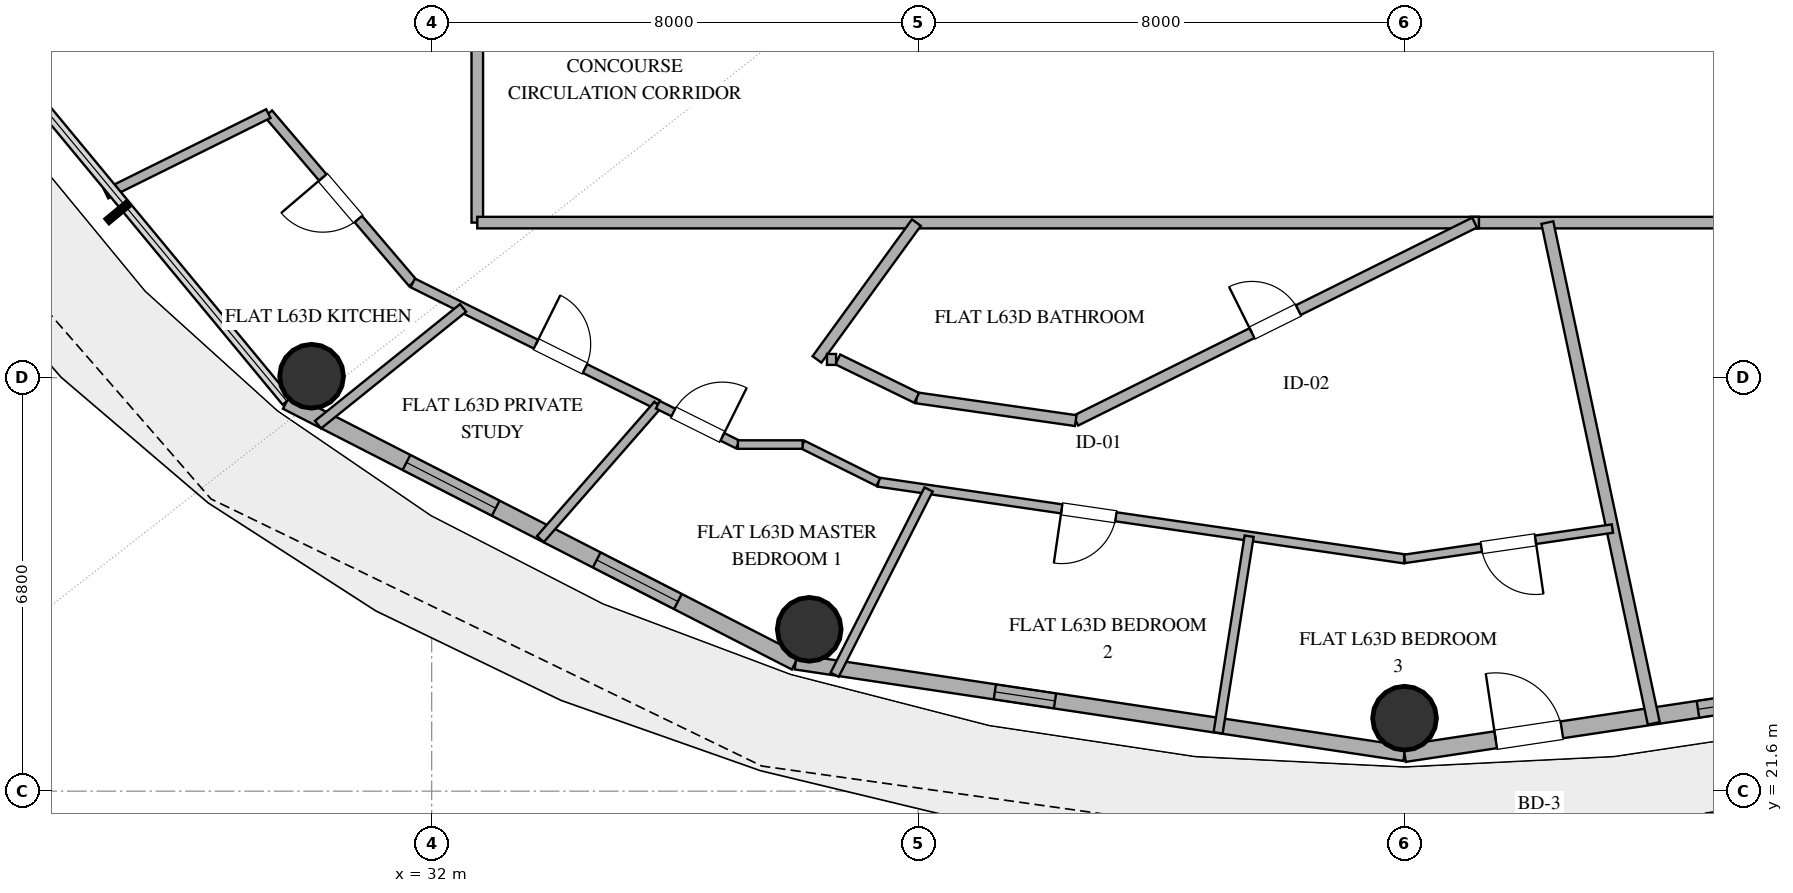
"""IFC4 building model, lengths in metres.
Left out: names, types, materials, properties, quantities, classifications, styles, units other than length and angle.
Written with IfcOpenShell. Run it as: python <this file> out.ifc"""

import sys

from ifc_helpers import new_model, si_unit, direction, frame, frame_2d, origin, origin_2d, place, context, subcontext, project, spatial, rectangle, hollow_circle, extrude, element, fill, save


model = new_model("IFC4")
c1 = context("Model", 3, precision=1e-05, world=origin(), true_north=direction((0.0, 1.0)))
c2 = subcontext(c1, "Body", "Model", "MODEL_VIEW")
j1 = project(units=[si_unit("LENGTHUNIT", "METRE"), si_unit("PLANEANGLEUNIT", "RADIAN")], contexts=[c1])
p1 = place(None, origin())
s1 = spatial("IfcSite", under=j1, at=p1, CompositionType="ELEMENT")
p2 = place(p1, origin())
s2 = spatial("IfcBuilding", under=s1, at=p2, CompositionType="ELEMENT")
p3 = place(p2, frame((0.0, 0.0, 246.0)))
s3 = spatial("IfcBuildingStorey", under=s2, at=p3, CompositionType="ELEMENT", Elevation=246.0)
for number, where, z_axis, x_axis in (
    (1, (30.025, 28.424, 0.0), (0.0, 0.0, 1.0), (1.0, 0.0, 0.0)),
    (2, (38.209, 24.261, 0.0), (0.0, 0.0, 1.0), (1.0, 0.0, 0.0)),
    (3, (48.0, 22.8, 0.0), (0.0, 0.0, 1.0), (1.0, 0.0, 0.0)),
):
    element("IfcColumn", number, at=place(p3, frame(where, z_axis=z_axis, x_axis=x_axis)), inside=s3, PredefinedType="COLUMN", context=c2, shape_type="SweptSolid", body=[
        extrude(hollow_circle(Radius=0.525, WallThickness=0.028, at=origin_2d()), origin(), (0.0, 0.0, 1.0), 3.36),
    ])
p4 = place(p3, frame((29.617, 28.013, 0.0), z_axis=(0.0, 0.0, 1.0), x_axis=(0.890007394051, -0.455946091699, 0.0)))
e4 = element("IfcWall", 4, at=p4, inside=s3, PredefinedType="SOLIDWALL", context=c2, shape_type="SweptSolid", body=[
    extrude(rectangle(XDim=9.404, YDim=0.28, at=frame_2d((4.702, 0.0))), origin(), (0.0, 0.0, 1.0), 3.36),
])
p5 = place(p4, frame((2.211, 0.0, 0.85)))
e5 = element("IfcOpeningElement", 5, at=p5, cuts=e4, PredefinedType="OPENING", context=c2, shape_type="SweptSolid", body=[
    extrude(rectangle(XDim=1.65, YDim=2.0, at=frame_2d((0.825, 1.0))), frame((0.0, 0.15, 0.0), z_axis=(0.0, -1.0, 0.0), x_axis=(1.0, 0.0, 0.0)), (0.0, 0.0, 1.0), 0.3),
])
p6 = place(p4, frame((5.727, 0.0, 0.85)))
e6 = element("IfcOpeningElement", 6, at=p6, cuts=e4, PredefinedType="OPENING", context=c2, shape_type="SweptSolid", body=[
    extrude(rectangle(XDim=1.5, YDim=2.0, at=frame_2d((0.75, 1.0))), frame((0.0, 0.15, 0.0), z_axis=(0.0, -1.0, 0.0), x_axis=(1.0, 0.0, 0.0)), (0.0, 0.0, 1.0), 0.3),
])
p7 = place(p3, frame((37.987, 23.726, 0.0), z_axis=(0.0, 0.0, 1.0), x_axis=(0.988882522213, -0.148698881169, 0.0)))
e7 = element("IfcWall", 7, at=p7, inside=s3, PredefinedType="SOLIDWALL", context=c2, shape_type="SweptSolid", body=[
    extrude(rectangle(XDim=10.125, YDim=0.25, at=frame_2d((5.062, 0.0))), origin(), (0.0, 0.0, 1.0), 3.36),
])
p8 = place(p7, frame((3.312, 0.0, 0.35)))
e8 = element("IfcOpeningElement", 8, at=p8, cuts=e7, PredefinedType="OPENING", context=c2, shape_type="SweptSolid", body=[
    extrude(rectangle(XDim=1.0, YDim=1.05, at=frame_2d((0.5, 0.525))), frame((0.0, 0.135, 0.0), z_axis=(0.0, -1.0, 0.0), x_axis=(1.0, 0.0, 0.0)), (0.0, 0.0, 1.0), 0.27),
])
p9 = place(p3, frame((48.0, 22.22, 0.0), z_axis=(0.0, 0.0, 1.0), x_axis=(0.988882522213, 0.148698881169, 0.0)))
e9 = element("IfcWall", 9, at=p9, inside=s3, PredefinedType="SOLIDWALL", context=c2, shape_type="SweptSolid", body=[
    extrude(rectangle(XDim=10.125, YDim=0.28, at=frame_2d((5.062, 0.0))), origin(), (0.0, 0.0, 1.0), 3.36),
])
p10 = place(p9, frame((1.516, 0.0, 0.0)))
e10 = element("IfcOpeningElement", 10, at=p10, cuts=e9, PredefinedType="OPENING", context=c2, shape_type="SweptSolid", body=[
    extrude(rectangle(XDim=1.1, YDim=2.25, at=frame_2d((0.55, 1.125))), frame((0.0, 0.15, 0.0), z_axis=(0.0, -1.0, 0.0), x_axis=(1.0, 0.0, 0.0)), (0.0, 0.0, 1.0), 0.3),
])
p11 = place(p9, frame((4.88, 0.0, 0.85)))
e11 = element("IfcOpeningElement", 11, at=p11, cuts=e9, PredefinedType="OPENING", context=c2, shape_type="SweptSolid", body=[
    extrude(rectangle(XDim=1.35, YDim=1.8, at=frame_2d((0.675, 0.9))), frame((0.0, 0.15, 0.0), z_axis=(0.0, -1.0, 0.0), x_axis=(1.0, 0.0, 0.0)), (0.0, 0.0, 1.0), 0.3),
])
p12 = place(p9, frame((6.733, 0.0, 0.85)))
e12 = element("IfcOpeningElement", 12, at=p12, cuts=e9, PredefinedType="OPENING", context=c2, shape_type="SweptSolid", body=[
    extrude(rectangle(XDim=1.35, YDim=1.8, at=frame_2d((0.675, 0.9))), frame((0.0, 0.15, 0.0), z_axis=(0.0, -1.0, 0.0), x_axis=(1.0, 0.0, 0.0)), (0.0, 0.0, 1.0), 0.3),
])
p13 = place(p3, frame((63.25, 30.95, 0.0), z_axis=(0.0, 0.0, 1.0), x_axis=(-1.0, 0.0, 0.0)))
e13 = element("IfcWall", 13, at=p13, inside=s3, PredefinedType="PARTITIONING", context=c2, shape_type="SweptSolid", body=[
    extrude(rectangle(XDim=14.17, YDim=0.19, at=frame_2d((7.085, 0.0))), origin(), (0.0, 0.0, 1.0), 2.72),
])
p14 = place(p13, frame((5.967, 0.0, 0.0)))
e14 = element("IfcOpeningElement", 14, at=p14, cuts=e13, PredefinedType="OPENING", context=c2, shape_type="SweptSolid", body=[
    extrude(rectangle(XDim=1.0, YDim=2.2, at=frame_2d((0.5, 1.1))), frame((0.0, 0.105, 0.0), z_axis=(0.0, -1.0, 0.0), x_axis=(1.0, 0.0, 0.0)), (0.0, 0.0, 1.0), 0.21),
])
p15 = place(p3, frame((32.75, 30.95, 0.0), z_axis=(0.0, 0.0, 1.0), x_axis=(0.0, 1.0, 0.0)))
e15 = element("IfcWall", 15, at=p15, inside=s3, PredefinedType="PARTITIONING", context=c2, shape_type="SweptSolid", body=[
    extrude(rectangle(XDim=22.1, YDim=0.19, at=frame_2d((11.05, 0.0))), origin(), (0.0, 0.0, 1.0), 2.72),
])
p16 = place(p15, frame((15.258, 0.0, 0.0)))
e16 = element("IfcOpeningElement", 16, at=p16, cuts=e15, PredefinedType="OPENING", context=c2, shape_type="SweptSolid", body=[
    extrude(rectangle(XDim=1.0, YDim=2.2, at=frame_2d((0.5, 1.1))), frame((0.0, 0.105, 0.0), z_axis=(0.0, -1.0, 0.0), x_axis=(1.0, 0.0, 0.0)), (0.0, 0.0, 1.0), 0.21),
])
p17 = place(p15, frame((4.24, 0.0, 0.0)))
e17 = element("IfcOpeningElement", 17, at=p17, cuts=e15, PredefinedType="OPENING", context=c2, shape_type="SweptSolid", body=[
    extrude(rectangle(XDim=1.0, YDim=2.2, at=frame_2d((0.5, 1.1))), frame((0.0, 0.105, 0.0), z_axis=(0.0, -1.0, 0.0), x_axis=(1.0, 0.0, 0.0)), (0.0, 0.0, 1.0), 0.21),
])
p18 = place(p3, frame((49.224, 30.95, 0.0), z_axis=(0.0, 0.0, 1.0), x_axis=(-1.0, 0.0, 0.0)))
e18 = element("IfcWall", 18, at=p18, inside=s3, PredefinedType="PARTITIONING", context=c2, shape_type="SweptSolid", body=[
    extrude(rectangle(XDim=16.474, YDim=0.19, at=frame_2d((8.237, 0.0))), origin(), (0.0, 0.0, 1.0), 2.72),
])
p19 = place(p3, frame((42.593, 27.694, 0.0), z_axis=(0.0, 0.0, 1.0), x_axis=(0.895690491041, 0.444678023134, 0.0)))
e19 = element("IfcWall", 19, at=p19, inside=s3, PredefinedType="PLUMBINGWALL", context=c2, shape_type="SweptSolid", body=[
    extrude(rectangle(XDim=7.323, YDim=0.18, at=frame_2d((3.662, 0.0))), origin(), (0.0, 0.0, 1.0), 2.72),
])
p20 = place(p19, frame((3.237, 0.0, 0.0)))
e20 = element("IfcOpeningElement", 20, at=p20, cuts=e19, PredefinedType="OPENING", context=c2, shape_type="SweptSolid", body=[
    extrude(rectangle(XDim=0.85, YDim=2.1, at=frame_2d((0.425, 1.05))), frame((0.0, 0.1, 0.0), z_axis=(0.0, -1.0, 0.0), x_axis=(1.0, 0.0, 0.0)), (0.0, 0.0, 1.0), 0.2),
])
p21 = place(p3, frame((48.0, 25.42, 0.0), z_axis=(0.0, 0.0, 1.0), x_axis=(-0.989532150642, 0.144312587273, 0.0)))
e21 = element("IfcWall", 21, at=p21, inside=s3, PredefinedType="PARTITIONING", context=c2, shape_type="SweptSolid", body=[
    extrude(rectangle(XDim=8.746, YDim=0.15, at=frame_2d((4.373, 0.0))), origin(), (0.0, 0.0, 1.0), 2.72),
])
p22 = place(p21, frame((4.798, 0.0, 0.0)))
e22 = element("IfcOpeningElement", 22, at=p22, cuts=e21, PredefinedType="OPENING", context=c2, shape_type="SweptSolid", body=[
    extrude(rectangle(XDim=0.9, YDim=2.1, at=frame_2d((0.45, 1.05))), frame((0.0, 0.085, 0.0), z_axis=(0.0, -1.0, 0.0), x_axis=(1.0, 0.0, 0.0)), (0.0, 0.0, 1.0), 0.17),
])
p23 = place(p3, frame((50.349, 30.95, 0.0), z_axis=(0.0, 0.0, 1.0), x_axis=(0.207930550935, -0.978143591702, 0.0)))
e23 = element("IfcWall", 23, at=p23, inside=s3, PredefinedType="PARTITIONING", context=c2, shape_type="SweptSolid", body=[
    extrude(rectangle(XDim=8.419, YDim=0.2, at=frame_2d((4.209, 0.0))), origin(), (0.0, 0.0, 1.0), 2.72),
])
p24 = place(p3, frame((31.689, 29.958, 0.0), z_axis=(0.0, 0.0, 1.0), x_axis=(-0.648993169548, 0.7607942336, 0.0)))
e24 = element("IfcWall", 24, at=p24, inside=s3, PredefinedType="PLUMBINGWALL", context=c2, shape_type="SweptSolid", body=[
    extrude(rectangle(XDim=3.66, YDim=0.16, at=frame_2d((1.83, 0.0))), origin(), (0.0, 0.0, 1.0), 2.72),
])
p25 = place(p24, frame((1.38, 0.0, 0.0)))
e25 = element("IfcOpeningElement", 25, at=p25, cuts=e24, PredefinedType="OPENING", context=c2, shape_type="SweptSolid", body=[
    extrude(rectangle(XDim=0.9, YDim=2.1, at=frame_2d((0.45, 1.05))), frame((0.0, 0.09, 0.0), z_axis=(0.0, -1.0, 0.0), x_axis=(1.0, 0.0, 0.0)), (0.0, 0.0, 1.0), 0.18),
])
p26 = place(p3, frame((31.689, 29.958, 0.0), z_axis=(0.0, 0.0, 1.0), x_axis=(0.895477004863, -0.445107777691, 0.0)))
e26 = element("IfcWall", 26, at=p26, inside=s3, PredefinedType="PLUMBINGWALL", context=c2, shape_type="SweptSolid", body=[
    extrude(rectangle(XDim=4.501, YDim=0.16, at=frame_2d((2.25, 0.0))), origin(), (0.0, 0.0, 1.0), 2.72),
])
p27 = place(p26, frame((2.263, 0.0, 0.0)))
e27 = element("IfcOpeningElement", 27, at=p27, cuts=e26, PredefinedType="OPENING", context=c2, shape_type="SweptSolid", body=[
    extrude(rectangle(XDim=0.9, YDim=2.1, at=frame_2d((0.45, 1.05))), frame((0.0, 0.09, 0.0), z_axis=(0.0, -1.0, 0.0), x_axis=(1.0, 0.0, 0.0)), (0.0, 0.0, 1.0), 0.18),
])
p28 = place(p3, frame((51.418, 25.918, 0.0), z_axis=(0.0, 0.0, 1.0), x_axis=(-0.989531088682, -0.144319868801, 0.0)))
e28 = element("IfcWall", 28, at=p28, inside=s3, PredefinedType="PARTITIONING", context=c2, shape_type="SweptSolid", body=[
    extrude(rectangle(XDim=3.454, YDim=0.14, at=frame_2d((1.727, 0.0))), origin(), (0.0, 0.0, 1.0), 2.72),
])
p29 = place(p28, frame((1.277, 0.0, 0.0)))
e29 = element("IfcOpeningElement", 29, at=p29, cuts=e28, PredefinedType="OPENING", context=c2, shape_type="SweptSolid", body=[
    extrude(rectangle(XDim=0.9, YDim=2.1, at=frame_2d((0.45, 1.05))), frame((0.0, 0.08, 0.0), z_axis=(0.0, -1.0, 0.0), x_axis=(1.0, 0.0, 0.0)), (0.0, 0.0, 1.0), 0.16),
])
p30 = place(p3, frame((40.172, 26.562, 0.0), z_axis=(0.0, 0.0, 1.0), x_axis=(-0.452265757691, -0.891883223533, 0.0)))
e30 = element("IfcWall", 30, at=p30, inside=s3, PredefinedType="PARTITIONING", context=c2, shape_type="SweptSolid", body=[
    extrude(rectangle(XDim=3.417, YDim=0.15, at=frame_2d((1.708, 0.0))), origin(), (0.0, 0.0, 1.0), 2.72),
])
p31 = place(p3, frame((44.934, 22.56, 0.0), z_axis=(0.0, 0.0, 1.0), x_axis=(0.155828503033, 0.98778412502, 0.0)))
e31 = element("IfcWall", 31, at=p31, inside=s3, PredefinedType="PARTITIONING", context=c2, shape_type="SweptSolid", body=[
    extrude(rectangle(XDim=3.273, YDim=0.15, at=frame_2d((1.636, 0.0))), origin(), (0.0, 0.0, 1.0), 2.72),
])
p32 = place(p3, frame((30.131, 27.627, 0.0), z_axis=(0.0, 0.0, 1.0), x_axis=(0.779248157205, 0.62671549326, 0.0)))
e32 = element("IfcWall", 32, at=p32, inside=s3, PredefinedType="PLUMBINGWALL", context=c2, shape_type="SweptSolid", body=[
    extrude(rectangle(XDim=3.062, YDim=0.16, at=frame_2d((1.531, 0.0))), origin(), (0.0, 0.0, 1.0), 2.72),
])
p33 = place(p3, frame((29.314, 32.742, 0.0), z_axis=(0.0, 0.0, 1.0), x_axis=(-0.896093729672, -0.443864875432, 0.0)))
e33 = element("IfcWall", 33, at=p33, inside=s3, PredefinedType="PLUMBINGWALL", context=c2, shape_type="SweptSolid", body=[
    extrude(rectangle(XDim=2.977, YDim=0.16, at=frame_2d((1.489, 0.0))), origin(), (0.0, 0.0, 1.0), 2.72),
])
p34 = place(p3, frame((35.719, 27.955, 0.0), z_axis=(0.0, 0.0, 1.0), x_axis=(-0.658257126569, -0.752793169019, 0.0)))
e34 = element("IfcWall", 34, at=p34, inside=s3, PredefinedType="PARTITIONING", context=c2, shape_type="SweptSolid", body=[
    extrude(rectangle(XDim=2.934, YDim=0.15, at=frame_2d((1.467, 0.0))), origin(), (0.0, 0.0, 1.0), 2.72),
])
p35 = place(p3, frame((39.972, 30.95, 0.0), z_axis=(0.0, 0.0, 1.0), x_axis=(-0.587795827483, -0.809009310944, 0.0)))
e35 = element("IfcWall", 35, at=p35, inside=s3, PredefinedType="PLUMBINGWALL", context=c2, shape_type="SweptSolid", body=[
    extrude(rectangle(XDim=2.781, YDim=0.18, at=frame_2d((1.391, 0.0))), origin(), (0.0, 0.0, 1.0), 2.72),
])
p36 = place(p3, frame((39.976, 28.068, 0.0), z_axis=(0.0, 0.0, 1.0), x_axis=(0.989923613655, -0.141602398034, 0.0)))
e36 = element("IfcWall", 36, at=p36, inside=s3, PredefinedType="PLUMBINGWALL", context=c2, shape_type="SweptSolid", body=[
    extrude(rectangle(XDim=2.643, YDim=0.18, at=frame_2d((1.322, 0.0))), origin(), (0.0, 0.0, 1.0), 2.72),
])
p37 = place(p3, frame((35.719, 27.955, 0.0), z_axis=(0.0, 0.0, 1.0), x_axis=(0.895454269924, -0.445153513381, 0.0)))
e37 = element("IfcWall", 37, at=p37, inside=s3, PredefinedType="PARTITIONING", context=c2, shape_type="SweptSolid", body=[
    extrude(rectangle(XDim=1.47, YDim=0.14, at=frame_2d((0.735, 0.0))), origin(), (0.0, 0.0, 1.0), 2.72),
])
p38 = place(p37, frame((0.285, 0.0, 0.0)))
e38 = element("IfcOpeningElement", 38, at=p38, cuts=e37, PredefinedType="OPENING", context=c2, shape_type="SweptSolid", body=[
    extrude(rectangle(XDim=0.9, YDim=2.1, at=frame_2d((0.45, 1.05))), frame((0.0, 0.08, 0.0), z_axis=(0.0, -1.0, 0.0), x_axis=(1.0, 0.0, 0.0)), (0.0, 0.0, 1.0), 0.16),
])
p39 = place(p3, frame((38.679, 28.7, 0.0), z_axis=(0.0, 0.0, 1.0), x_axis=(0.898916394035, -0.438120207861, 0.0)))
e39 = element("IfcWall", 39, at=p39, inside=s3, PredefinedType="PLUMBINGWALL", context=c2, shape_type="SweptSolid", body=[
    extrude(rectangle(XDim=1.443, YDim=0.18, at=frame_2d((0.721, 0.0))), origin(), (0.0, 0.0, 1.0), 2.72),
])
p40 = place(p3, frame((38.101, 27.3, 0.0), z_axis=(0.0, 0.0, 1.0), x_axis=(0.895584310315, -0.444891833053, 0.0)))
e40 = element("IfcWall", 40, at=p40, inside=s3, PredefinedType="PARTITIONING", context=c2, shape_type="SweptSolid", body=[
    extrude(rectangle(XDim=1.389, YDim=0.14, at=frame_2d((0.694, 0.0))), origin(), (0.0, 0.0, 1.0), 2.72),
])
p41 = place(p3, frame((37.036, 27.3, 0.0), z_axis=(0.0, 0.0, 1.0), x_axis=(1.0, 0.0, 0.0)))
e41 = element("IfcWall", 41, at=p41, inside=s3, PredefinedType="PARTITIONING", context=c2, shape_type="SweptSolid", body=[
    extrude(rectangle(XDim=1.065, YDim=0.14, at=frame_2d((0.533, 0.0))), origin(), (0.0, 0.0, 1.0), 2.72),
])
p42 = place(p3, frame((38.501, 28.7, 0.0), z_axis=(0.0, 0.0, 1.0), x_axis=(1.0, 0.0, 0.0)))
e42 = element("IfcWall", 42, at=p42, inside=s3, PredefinedType="PLUMBINGWALL", context=c2, shape_type="SweptSolid", body=[
    extrude(rectangle(XDim=0.15, YDim=0.18, at=frame_2d((0.075, 0.0))), origin(), (0.0, 0.0, 1.0), 2.72),
])
p43 = place(p5, origin())
e43 = element("IfcWindow", 43, at=p43, inside=s3, PartitioningType="SINGLE_PANEL", PredefinedType="WINDOW", context=c2, shape_type="SweptSolid", body=[
    extrude(rectangle(XDim=1.65, YDim=2.0, at=frame_2d((0.825, 1.0))), frame((0.0, 0.03, 0.0), z_axis=(0.0, -1.0, 0.0), x_axis=(1.0, 0.0, 0.0)), (0.0, 0.0, 1.0), 0.06),
])
fill(e5, e43)
p44 = place(p6, origin())
e44 = element("IfcWindow", 44, at=p44, inside=s3, PartitioningType="SINGLE_PANEL", PredefinedType="WINDOW", context=c2, shape_type="SweptSolid", body=[
    extrude(rectangle(XDim=1.5, YDim=2.0, at=frame_2d((0.75, 1.0))), frame((0.0, 0.03, 0.0), z_axis=(0.0, -1.0, 0.0), x_axis=(1.0, 0.0, 0.0)), (0.0, 0.0, 1.0), 0.06),
])
fill(e6, e44)
p45 = place(p10, origin())
e45 = element("IfcDoor", 45, at=p45, inside=s3, OperationType="SINGLE_SWING_LEFT", PredefinedType="DOOR", context=c2, shape_type="SweptSolid", body=[
    extrude(rectangle(XDim=1.1, YDim=2.25, at=frame_2d((0.55, 1.125))), frame((0.0, 0.025, 0.0), z_axis=(0.0, -1.0, 0.0), x_axis=(1.0, 0.0, 0.0)), (0.0, 0.0, 1.0), 0.05),
])
fill(e10, e45)
p46 = place(p11, origin())
e46 = element("IfcWindow", 46, at=p46, inside=s3, PartitioningType="SINGLE_PANEL", PredefinedType="WINDOW", context=c2, shape_type="SweptSolid", body=[
    extrude(rectangle(XDim=1.35, YDim=1.8, at=frame_2d((0.675, 0.9))), frame((0.0, 0.03, 0.0), z_axis=(0.0, -1.0, 0.0), x_axis=(1.0, 0.0, 0.0)), (0.0, 0.0, 1.0), 0.06),
])
fill(e11, e46)
p47 = place(p8, origin())
e47 = element("IfcWindow", 47, at=p47, inside=s3, PartitioningType="SINGLE_PANEL", PredefinedType="WINDOW", context=c2, shape_type="SweptSolid", body=[
    extrude(rectangle(XDim=1.0, YDim=1.05, at=frame_2d((0.5, 0.525))), frame((0.0, 0.03, 0.0), z_axis=(0.0, -1.0, 0.0), x_axis=(1.0, 0.0, 0.0)), (0.0, 0.0, 1.0), 0.06),
])
fill(e8, e47)
p48 = place(p20, origin())
e48 = element("IfcDoor", 48, at=p48, inside=s3, OperationType="SINGLE_SWING_LEFT", PredefinedType="DOOR", context=c2, shape_type="SweptSolid", body=[
    extrude(rectangle(XDim=0.85, YDim=2.1, at=frame_2d((0.425, 1.05))), frame((0.0, 0.025, 0.0), z_axis=(0.0, -1.0, 0.0), x_axis=(1.0, 0.0, 0.0)), (0.0, 0.0, 1.0), 0.05),
])
fill(e20, e48)
p49 = place(p22, origin())
e49 = element("IfcDoor", 49, at=p49, inside=s3, OperationType="SINGLE_SWING_RIGHT", PredefinedType="DOOR", context=c2, shape_type="SweptSolid", body=[
    extrude(rectangle(XDim=0.9, YDim=2.1, at=frame_2d((0.45, 1.05))), frame((0.0, 0.025, 0.0), z_axis=(0.0, -1.0, 0.0), x_axis=(1.0, 0.0, 0.0)), (0.0, 0.0, 1.0), 0.05),
])
fill(e22, e49)
p50 = place(p25, origin())
e50 = element("IfcDoor", 50, at=p50, inside=s3, OperationType="SINGLE_SWING_RIGHT", PredefinedType="DOOR", context=c2, shape_type="SweptSolid", body=[
    extrude(rectangle(XDim=0.9, YDim=2.1, at=frame_2d((0.45, 1.05))), frame((0.0, 0.025, 0.0), z_axis=(0.0, -1.0, 0.0), x_axis=(1.0, 0.0, 0.0)), (0.0, 0.0, 1.0), 0.05),
])
fill(e25, e50)
p51 = place(p27, origin())
e51 = element("IfcDoor", 51, at=p51, inside=s3, OperationType="SINGLE_SWING_LEFT", PredefinedType="DOOR", context=c2, shape_type="SweptSolid", body=[
    extrude(rectangle(XDim=0.9, YDim=2.1, at=frame_2d((0.45, 1.05))), frame((0.0, 0.025, 0.0), z_axis=(0.0, -1.0, 0.0), x_axis=(1.0, 0.0, 0.0)), (0.0, 0.0, 1.0), 0.05),
])
fill(e27, e51)
p52 = place(p29, origin())
e52 = element("IfcDoor", 52, at=p52, inside=s3, OperationType="SINGLE_SWING_LEFT", PredefinedType="DOOR", context=c2, shape_type="SweptSolid", body=[
    extrude(rectangle(XDim=0.9, YDim=2.1, at=frame_2d((0.45, 1.05))), frame((0.0, 0.025, 0.0), z_axis=(0.0, -1.0, 0.0), x_axis=(1.0, 0.0, 0.0)), (0.0, 0.0, 1.0), 0.05),
])
fill(e29, e52)
p53 = place(p38, origin())
e53 = element("IfcDoor", 53, at=p53, inside=s3, OperationType="SINGLE_SWING_RIGHT", PredefinedType="DOOR", context=c2, shape_type="SweptSolid", body=[
    extrude(rectangle(XDim=0.9, YDim=2.1, at=frame_2d((0.45, 1.05))), frame((0.0, 0.025, 0.0), z_axis=(0.0, -1.0, 0.0), x_axis=(1.0, 0.0, 0.0)), (0.0, 0.0, 1.0), 0.05),
])
fill(e38, e53)
save(model, sys.argv[1])
